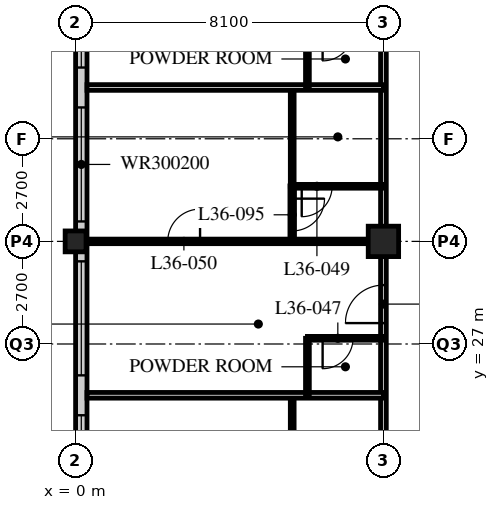
"""IFC4 building model, lengths in metres.
Left out: names, types, materials, properties, quantities, classifications, styles, units other than length and angle.
Written with IfcOpenShell. Run it as: python <this file> out.ifc"""

import sys

from ifc_helpers import new_model, si_unit, direction, frame, frame_2d, origin, origin_2d, place, context, subcontext, project, spatial, rectangle, hollow_rectangle, extrude, element, fill, save


model = new_model("IFC4")
c1 = context("Model", 3, precision=1e-05, world=origin(), true_north=direction((0.0, 1.0)))
c2 = subcontext(c1, "Body", "Model", "MODEL_VIEW")
j1 = project(units=[si_unit("LENGTHUNIT", "METRE"), si_unit("PLANEANGLEUNIT", "RADIAN")], contexts=[c1])
p1 = place(None, origin())
s1 = spatial("IfcSite", under=j1, at=p1, CompositionType="ELEMENT")
p2 = place(p1, origin())
s2 = spatial("IfcBuilding", under=s1, at=p2, CompositionType="ELEMENT")
p3 = place(p2, frame((0.0, 0.0, 140.8)))
s3 = spatial("IfcBuildingStorey", under=s2, at=p3, CompositionType="ELEMENT", Elevation=140.8)
p4 = place(p3, frame((0.0, 29.7, 0.0), z_axis=(0.0, 0.0, 1.0), x_axis=(1.0, 0.0, 0.0)))
e1 = element("IfcColumn", 1, at=p4, inside=s3, PredefinedType="COLUMN", context=c2, shape_type="SweptSolid", body=[
    extrude(hollow_rectangle(XDim=0.55, YDim=0.55, WallThickness=0.04, at=origin_2d()), origin(), (0.0, 0.0, 1.0), 3.4),
])
p5 = place(p3, frame((8.1, 29.7, 0.0), z_axis=(0.0, 0.0, 1.0), x_axis=(1.0, 0.0, 0.0)))
e2 = element("IfcColumn", 2, at=p5, inside=s3, PredefinedType="COLUMN", context=c2, shape_type="SweptSolid", body=[
    extrude(hollow_rectangle(XDim=0.8, YDim=0.8, WallThickness=0.08, at=origin_2d()), origin(), (0.0, 0.0, 1.0), 3.4),
])
p6 = place(p3, frame((0.15, 45.6, 0.0), z_axis=(0.0, 0.0, 1.0), x_axis=(0.0, -1.0, 0.0)))
e3 = element("IfcWall", 3, at=p6, inside=s3, PredefinedType="SOLIDWALL", context=c2, shape_type="SweptSolid", body=[
    extrude(rectangle(XDim=32.1, YDim=0.3, at=frame_2d((16.05, 0.0))), origin(), (0.0, 0.0, 1.0), 3.19),
])
p7 = place(p6, frame((0.225, 0.0, 0.9)))
e4 = element("IfcOpeningElement", 4, at=p7, cuts=e3, PredefinedType="OPENING", context=c2, shape_type="SweptSolid", body=[
    extrude(rectangle(XDim=3.0, YDim=2.0, at=frame_2d((1.5, 1.0))), frame((0.0, 0.16, 0.0), z_axis=(0.0, -1.0, 0.0), x_axis=(1.0, 0.0, 0.0)), (0.0, 0.0, 1.0), 0.32),
])
p8 = place(p6, frame((4.275, 0.0, 0.9)))
e5 = element("IfcOpeningElement", 5, at=p8, cuts=e3, PredefinedType="OPENING", context=c2, shape_type="SweptSolid", body=[
    extrude(rectangle(XDim=3.0, YDim=2.0, at=frame_2d((1.5, 1.0))), frame((0.0, 0.16, 0.0), z_axis=(0.0, -1.0, 0.0), x_axis=(1.0, 0.0, 0.0)), (0.0, 0.0, 1.0), 0.32),
])
p9 = place(p6, frame((8.325, 0.0, 0.9)))
e6 = element("IfcOpeningElement", 6, at=p9, cuts=e3, PredefinedType="OPENING", context=c2, shape_type="SweptSolid", body=[
    extrude(rectangle(XDim=3.0, YDim=2.0, at=frame_2d((1.5, 1.0))), frame((0.0, 0.16, 0.0), z_axis=(0.0, -1.0, 0.0), x_axis=(1.0, 0.0, 0.0)), (0.0, 0.0, 1.0), 0.32),
])
p10 = place(p6, frame((12.375, 0.0, 0.9)))
e7 = element("IfcOpeningElement", 7, at=p10, cuts=e3, PredefinedType="OPENING", context=c2, shape_type="SweptSolid", body=[
    extrude(rectangle(XDim=3.0, YDim=2.0, at=frame_2d((1.5, 1.0))), frame((0.0, 0.16, 0.0), z_axis=(0.0, -1.0, 0.0), x_axis=(1.0, 0.0, 0.0)), (0.0, 0.0, 1.0), 0.32),
])
p11 = place(p6, frame((16.425, 0.0, 0.9)))
e8 = element("IfcOpeningElement", 8, at=p11, cuts=e3, PredefinedType="OPENING", context=c2, shape_type="SweptSolid", body=[
    extrude(rectangle(XDim=3.0, YDim=2.0, at=frame_2d((1.5, 1.0))), frame((0.0, 0.16, 0.0), z_axis=(0.0, -1.0, 0.0), x_axis=(1.0, 0.0, 0.0)), (0.0, 0.0, 1.0), 0.32),
])
p12 = place(p6, frame((20.475, 0.0, 0.9)))
e9 = element("IfcOpeningElement", 9, at=p12, cuts=e3, PredefinedType="OPENING", context=c2, shape_type="SweptSolid", body=[
    extrude(rectangle(XDim=3.0, YDim=2.0, at=frame_2d((1.5, 1.0))), frame((0.0, 0.16, 0.0), z_axis=(0.0, -1.0, 0.0), x_axis=(1.0, 0.0, 0.0)), (0.0, 0.0, 1.0), 0.32),
])
p13 = place(p6, frame((24.525, 0.0, 0.9)))
e10 = element("IfcOpeningElement", 10, at=p13, cuts=e3, PredefinedType="OPENING", context=c2, shape_type="SweptSolid", body=[
    extrude(rectangle(XDim=3.0, YDim=2.0, at=frame_2d((1.5, 1.0))), frame((0.0, 0.16, 0.0), z_axis=(0.0, -1.0, 0.0), x_axis=(1.0, 0.0, 0.0)), (0.0, 0.0, 1.0), 0.32),
])
p14 = place(p6, frame((28.575, 0.0, 0.9)))
e11 = element("IfcOpeningElement", 11, at=p14, cuts=e3, PredefinedType="OPENING", context=c2, shape_type="SweptSolid", body=[
    extrude(rectangle(XDim=3.0, YDim=2.0, at=frame_2d((1.5, 1.0))), frame((0.0, 0.16, 0.0), z_axis=(0.0, -1.0, 0.0), x_axis=(1.0, 0.0, 0.0)), (0.0, 0.0, 1.0), 0.32),
])
p15 = place(p3, frame((8.1, 17.55, 0.0), z_axis=(0.0, 0.0, 1.0), x_axis=(0.0, 1.0, 0.0)))
e12 = element("IfcWall", 12, at=p15, inside=s3, PredefinedType="PARTITIONING", context=c2, shape_type="SweptSolid", body=[
    extrude(rectangle(XDim=28.35, YDim=0.15, at=frame_2d((14.175, 0.0))), origin(), (0.0, 0.0, 1.0), 2.578),
])
p16 = place(p15, frame((1.9, 0.0, 0.0)))
e13 = element("IfcOpeningElement", 13, at=p16, cuts=e12, PredefinedType="OPENING", context=c2, shape_type="SweptSolid", body=[
    extrude(rectangle(XDim=1.0, YDim=2.1, at=frame_2d((0.5, 1.05))), frame((0.0, 0.085, 0.0), z_axis=(0.0, -1.0, 0.0), x_axis=(1.0, 0.0, 0.0)), (0.0, 0.0, 1.0), 0.17),
])
p17 = place(p15, frame((10.0, 0.0, 0.0)))
e14 = element("IfcOpeningElement", 14, at=p17, cuts=e12, PredefinedType="OPENING", context=c2, shape_type="SweptSolid", body=[
    extrude(rectangle(XDim=1.0, YDim=2.1, at=frame_2d((0.5, 1.05))), frame((0.0, 0.085, 0.0), z_axis=(0.0, -1.0, 0.0), x_axis=(1.0, 0.0, 0.0)), (0.0, 0.0, 1.0), 0.17),
])
p18 = place(p15, frame((18.1, 0.0, 0.0)))
e15 = element("IfcOpeningElement", 15, at=p18, cuts=e12, PredefinedType="OPENING", context=c2, shape_type="SweptSolid", body=[
    extrude(rectangle(XDim=1.0, YDim=2.1, at=frame_2d((0.5, 1.05))), frame((0.0, 0.085, 0.0), z_axis=(0.0, -1.0, 0.0), x_axis=(1.0, 0.0, 0.0)), (0.0, 0.0, 1.0), 0.17),
])
p19 = place(p15, frame((24.9, 0.0, 0.0)))
e16 = element("IfcOpeningElement", 16, at=p19, cuts=e12, PredefinedType="OPENING", context=c2, shape_type="SweptSolid", body=[
    extrude(rectangle(XDim=1.0, YDim=2.1, at=frame_2d((0.5, 1.05))), frame((0.0, 0.085, 0.0), z_axis=(0.0, -1.0, 0.0), x_axis=(1.0, 0.0, 0.0)), (0.0, 0.0, 1.0), 0.17),
])
p20 = place(p3, frame((5.7, 23.05, 0.0), z_axis=(0.0, 0.0, 1.0), x_axis=(0.0, 1.0, 0.0)))
e17 = element("IfcWall", 17, at=p20, inside=s3, PredefinedType="PARTITIONING", context=c2, shape_type="SweptSolid", body=[
    extrude(rectangle(XDim=2.6, YDim=0.1, at=frame_2d((1.3, 0.0))), origin(), (0.0, 0.0, 1.0), 3.19),
])
p21 = place(p3, frame((8.1, 25.65, 0.0), z_axis=(0.0, 0.0, 1.0), x_axis=(-1.0, 0.0, 0.0)))
e18 = element("IfcWall", 18, at=p21, inside=s3, PredefinedType="PARTITIONING", context=c2, shape_type="SweptSolid", body=[
    extrude(rectangle(XDim=7.8, YDim=0.15, at=frame_2d((3.9, 0.0))), origin(), (0.0, 0.0, 1.0), 3.19),
])
p22 = place(p3, frame((6.1, 25.65, 0.0), z_axis=(0.0, 0.0, 1.0), x_axis=(0.0, 1.0, 0.0)))
e19 = element("IfcWall", 19, at=p22, inside=s3, PredefinedType="PARTITIONING", context=c2, shape_type="SweptSolid", body=[
    extrude(rectangle(XDim=1.5, YDim=0.1, at=frame_2d((0.75, 0.0))), origin(), (0.0, 0.0, 1.0), 3.19),
])
p23 = place(p3, frame((8.1, 27.15, 0.0), z_axis=(0.0, 0.0, 1.0), x_axis=(-1.0, 0.0, 0.0)))
e20 = element("IfcWall", 20, at=p23, inside=s3, PredefinedType="PARTITIONING", context=c2, shape_type="SweptSolid", body=[
    extrude(rectangle(XDim=2.0, YDim=0.1, at=frame_2d((1.0, 0.0))), origin(), (0.0, 0.0, 1.0), 3.19),
])
p24 = place(p23, frame((0.8, 0.0, 0.0)))
e21 = element("IfcOpeningElement", 21, at=p24, cuts=e20, PredefinedType="OPENING", context=c2, shape_type="SweptSolid", body=[
    extrude(rectangle(XDim=0.8, YDim=2.1, at=frame_2d((0.4, 1.05))), frame((0.0, 0.06, 0.0), z_axis=(0.0, -1.0, 0.0), x_axis=(1.0, 0.0, 0.0)), (0.0, 0.0, 1.0), 0.12),
])
p25 = place(p3, frame((5.7, 31.15, 0.0), z_axis=(0.0, 0.0, 1.0), x_axis=(0.0, 1.0, 0.0)))
e22 = element("IfcWall", 22, at=p25, inside=s3, PredefinedType="PARTITIONING", context=c2, shape_type="SweptSolid", body=[
    extrude(rectangle(XDim=2.6, YDim=0.1, at=frame_2d((1.3, 0.0))), origin(), (0.0, 0.0, 1.0), 3.19),
])
p26 = place(p3, frame((8.1, 31.15, 0.0), z_axis=(0.0, 0.0, 1.0), x_axis=(-1.0, 0.0, 0.0)))
e23 = element("IfcWall", 23, at=p26, inside=s3, PredefinedType="PARTITIONING", context=c2, shape_type="SweptSolid", body=[
    extrude(rectangle(XDim=2.4, YDim=0.1, at=frame_2d((1.2, 0.0))), origin(), (0.0, 0.0, 1.0), 3.19),
])
p27 = place(p26, frame((1.35, 0.0, 0.0)))
e24 = element("IfcOpeningElement", 24, at=p27, cuts=e23, PredefinedType="OPENING", context=c2, shape_type="SweptSolid", body=[
    extrude(rectangle(XDim=0.8, YDim=2.1, at=frame_2d((0.4, 1.05))), frame((0.0, 0.06, 0.0), z_axis=(0.0, -1.0, 0.0), x_axis=(1.0, 0.0, 0.0)), (0.0, 0.0, 1.0), 0.12),
])
p28 = place(p3, frame((8.1, 29.7, 0.0), z_axis=(0.0, 0.0, 1.0), x_axis=(-1.0, 0.0, 0.0)))
e25 = element("IfcWall", 25, at=p28, inside=s3, PredefinedType="PARTITIONING", context=c2, shape_type="SweptSolid", body=[
    extrude(rectangle(XDim=7.8, YDim=0.12, at=frame_2d((3.9, 0.0))), origin(), (0.0, 0.0, 1.0), 2.578),
])
p29 = place(p28, frame((4.825, 0.0, 0.0)))
e26 = element("IfcOpeningElement", 26, at=p29, cuts=e25, PredefinedType="OPENING", context=c2, shape_type="SweptSolid", body=[
    extrude(rectangle(XDim=0.85, YDim=2.1, at=frame_2d((0.425, 1.05))), frame((0.0, 0.07, 0.0), z_axis=(0.0, -1.0, 0.0), x_axis=(1.0, 0.0, 0.0)), (0.0, 0.0, 1.0), 0.14),
])
p30 = place(p3, frame((8.1, 33.75, 0.0), z_axis=(0.0, 0.0, 1.0), x_axis=(-1.0, 0.0, 0.0)))
e27 = element("IfcWall", 27, at=p30, inside=s3, PredefinedType="PARTITIONING", context=c2, shape_type="SweptSolid", body=[
    extrude(rectangle(XDim=7.8, YDim=0.15, at=frame_2d((3.9, 0.0))), origin(), (0.0, 0.0, 1.0), 3.19),
])
p31 = place(p3, frame((6.1, 33.75, 0.0), z_axis=(0.0, 0.0, 1.0), x_axis=(0.0, 1.0, 0.0)))
e28 = element("IfcWall", 28, at=p31, inside=s3, PredefinedType="PARTITIONING", context=c2, shape_type="SweptSolid", body=[
    extrude(rectangle(XDim=1.5, YDim=0.1, at=frame_2d((0.75, 0.0))), origin(), (0.0, 0.0, 1.0), 3.19),
])
p32 = place(p3, frame((5.7, 29.7, 0.0), z_axis=(0.0, 0.0, 1.0), x_axis=(0.0, 1.0, 0.0)))
e29 = element("IfcWall", 29, at=p32, inside=s3, PredefinedType="PARTITIONING", context=c2, shape_type="SweptSolid", body=[
    extrude(rectangle(XDim=1.46, YDim=0.12, at=frame_2d((0.73, 0.0))), origin(), (0.0, 0.0, 1.0), 3.19),
])
p33 = place(p32, frame((0.275, 0.0, 0.0)))
e30 = element("IfcOpeningElement", 30, at=p33, cuts=e29, PredefinedType="OPENING", context=c2, shape_type="SweptSolid", body=[
    extrude(rectangle(XDim=0.85, YDim=2.1, at=frame_2d((0.425, 1.05))), frame((0.0, 0.07, 0.0), z_axis=(0.0, -1.0, 0.0), x_axis=(1.0, 0.0, 0.0)), (0.0, 0.0, 1.0), 0.14),
])
p34 = place(p9, origin())
e31 = element("IfcWindow", 31, at=p34, inside=s3, PartitioningType="SINGLE_PANEL", PredefinedType="WINDOW", context=c2, shape_type="SweptSolid", body=[
    extrude(rectangle(XDim=3.0, YDim=2.0, at=frame_2d((1.5, 1.0))), frame((0.0, 0.03, 0.0), z_axis=(0.0, -1.0, 0.0), x_axis=(1.0, 0.0, 0.0)), (0.0, 0.0, 1.0), 0.06),
])
fill(e6, e31)
p35 = place(p10, origin())
e32 = element("IfcWindow", 32, at=p35, inside=s3, PartitioningType="SINGLE_PANEL", PredefinedType="WINDOW", context=c2, shape_type="SweptSolid", body=[
    extrude(rectangle(XDim=3.0, YDim=2.0, at=frame_2d((1.5, 1.0))), frame((0.0, 0.03, 0.0), z_axis=(0.0, -1.0, 0.0), x_axis=(1.0, 0.0, 0.0)), (0.0, 0.0, 1.0), 0.06),
])
fill(e7, e32)
p36 = place(p11, origin())
e33 = element("IfcWindow", 33, at=p36, inside=s3, PartitioningType="SINGLE_PANEL", PredefinedType="WINDOW", context=c2, shape_type="SweptSolid", body=[
    extrude(rectangle(XDim=3.0, YDim=2.0, at=frame_2d((1.5, 1.0))), frame((0.0, 0.03, 0.0), z_axis=(0.0, -1.0, 0.0), x_axis=(1.0, 0.0, 0.0)), (0.0, 0.0, 1.0), 0.06),
])
fill(e8, e33)
p37 = place(p12, origin())
e34 = element("IfcWindow", 34, at=p37, inside=s3, PartitioningType="SINGLE_PANEL", PredefinedType="WINDOW", context=c2, shape_type="SweptSolid", body=[
    extrude(rectangle(XDim=3.0, YDim=2.0, at=frame_2d((1.5, 1.0))), frame((0.0, 0.03, 0.0), z_axis=(0.0, -1.0, 0.0), x_axis=(1.0, 0.0, 0.0)), (0.0, 0.0, 1.0), 0.06),
])
fill(e9, e34)
p38 = place(p24, origin())
e35 = element("IfcDoor", 35, at=p38, inside=s3, OperationType="SINGLE_SWING_RIGHT", PredefinedType="DOOR", context=c2, shape_type="SweptSolid", body=[
    extrude(rectangle(XDim=0.8, YDim=2.1, at=frame_2d((0.4, 1.05))), frame((0.0, 0.025, 0.0), z_axis=(0.0, -1.0, 0.0), x_axis=(1.0, 0.0, 0.0)), (0.0, 0.0, 1.0), 0.05),
])
fill(e21, e35)
p39 = place(p17, origin())
e36 = element("IfcDoor", 36, at=p39, inside=s3, OperationType="SINGLE_SWING_LEFT", PredefinedType="DOOR", context=c2, shape_type="SweptSolid", body=[
    extrude(rectangle(XDim=1.0, YDim=2.1, at=frame_2d((0.5, 1.05))), frame((0.0, 0.025, 0.0), z_axis=(0.0, -1.0, 0.0), x_axis=(1.0, 0.0, 0.0)), (0.0, 0.0, 1.0), 0.05),
])
fill(e14, e36)
p40 = place(p27, origin())
e37 = element("IfcDoor", 37, at=p40, inside=s3, OperationType="SINGLE_SWING_RIGHT", PredefinedType="DOOR", context=c2, shape_type="SweptSolid", body=[
    extrude(rectangle(XDim=0.8, YDim=2.1, at=frame_2d((0.4, 1.05))), frame((0.0, 0.025, 0.0), z_axis=(0.0, -1.0, 0.0), x_axis=(1.0, 0.0, 0.0)), (0.0, 0.0, 1.0), 0.05),
])
fill(e24, e37)
p41 = place(p29, origin())
e38 = element("IfcDoor", 38, at=p41, inside=s3, OperationType="SINGLE_SWING_RIGHT", PredefinedType="DOOR", context=c2, shape_type="SweptSolid", body=[
    extrude(rectangle(XDim=0.85, YDim=2.1, at=frame_2d((0.425, 1.05))), frame((0.0, 0.025, 0.0), z_axis=(0.0, -1.0, 0.0), x_axis=(1.0, 0.0, 0.0)), (0.0, 0.0, 1.0), 0.05),
])
fill(e26, e38)
p42 = place(p33, origin())
e39 = element("IfcDoor", 39, at=p42, inside=s3, OperationType="SINGLE_SWING_LEFT", PredefinedType="DOOR", context=c2, shape_type="SweptSolid", body=[
    extrude(rectangle(XDim=0.85, YDim=2.1, at=frame_2d((0.425, 1.05))), frame((0.0, 0.025, 0.0), z_axis=(0.0, -1.0, 0.0), x_axis=(1.0, 0.0, 0.0)), (0.0, 0.0, 1.0), 0.05),
])
fill(e30, e39)
save(model, sys.argv[1])
